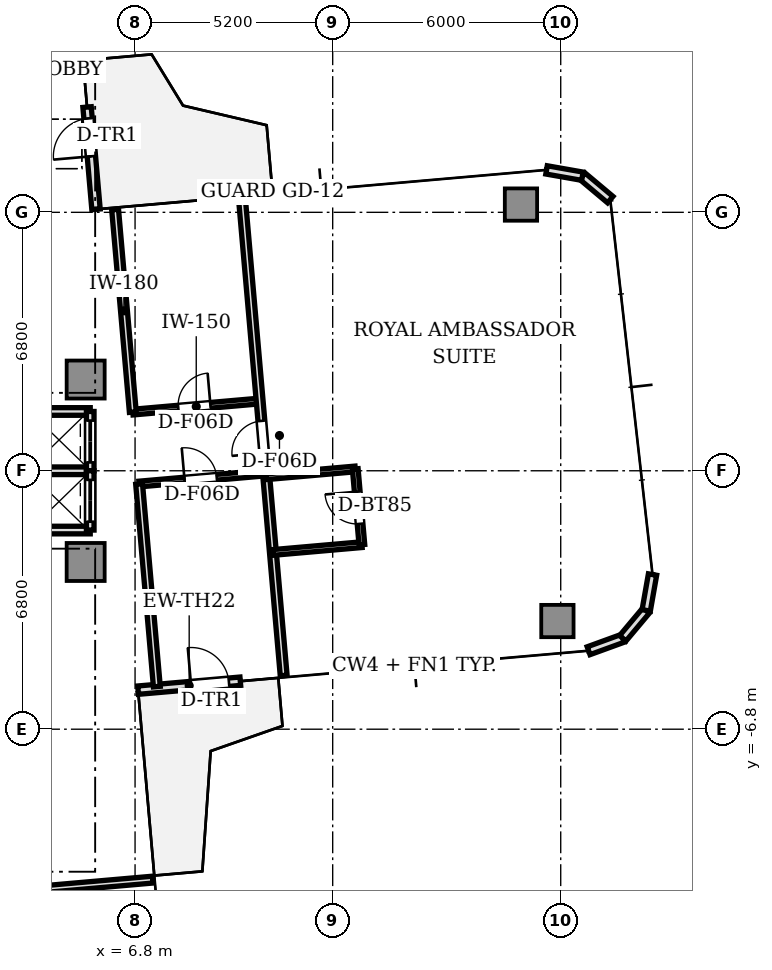
"""IFC4 building model, lengths in metres.
Left out: names, types, materials, properties, quantities, classifications, styles, units other than length and angle.
Written with IfcOpenShell. Run it as: python <this file> out.ifc"""

import sys

from ifc_helpers import new_model, si_unit, direction, frame, frame_2d, origin, origin_2d, place, context, subcontext, project, spatial, rectangle, extrude, source, transform, mapped, element, fill, save


model = new_model("IFC4")
c1 = context("Model", 3, precision=1e-05, world=origin(), true_north=direction((0.0, 1.0)))
c2 = subcontext(c1, "Body", "Model", "MODEL_VIEW")
j1 = project(units=[si_unit("LENGTHUNIT", "METRE"), si_unit("PLANEANGLEUNIT", "RADIAN")], contexts=[c1])
p1 = place(None, origin())
s1 = spatial("IfcSite", under=j1, at=p1, CompositionType="ELEMENT")
p2 = place(p1, origin())
s2 = spatial("IfcBuilding", under=s1, at=p2, CompositionType="ELEMENT")
p3 = place(p2, frame((0.0, 0.0, 147.25)))
s3 = spatial("IfcBuildingStorey", under=s2, at=p3, CompositionType="ELEMENT", Elevation=147.25)
m1 = source(origin(), c2, "Body", "SweptSolid", [
    extrude(rectangle(XDim=1.0, YDim=1.0, at=origin_2d()), origin(), (0.0, 0.0, 1.0), 3.11),
])
for number, where, z_axis, x_axis in (
    (1, (5.5, 2.4, 0.0), (0.0, 0.0, 1.0), (1.0, 0.0, 0.0)),
    (2, (5.5, -2.4, 0.0), (0.0, 0.0, 1.0), (1.0, 0.0, 0.0)),
):
    element("IfcColumn", number, at=place(p3, frame(where, z_axis=z_axis, x_axis=x_axis)), inside=s3, PredefinedType="COLUMN", context=c2, shape_type="MappedRepresentation", body=[
        mapped(m1, transform((0.0, 0.0, 0.0), scale=1.0)),
    ])
m2 = source(origin(), c2, "Body", "SweptSolid", [
    extrude(rectangle(XDim=0.85, YDim=0.85, at=origin_2d()), origin(), (0.0, 0.0, 1.0), 3.11),
])
for number, where, z_axis, x_axis in (
    (3, (17.913, -3.954, 0.0), (0.0, 0.0, 1.0), (1.0, 0.0, 0.0)),
    (4, (16.954, 7.004, 0.0), (0.0, 0.0, 1.0), (1.0, 0.0, 0.0)),
):
    element("IfcColumn", number, at=place(p3, frame(where, z_axis=z_axis, x_axis=x_axis)), inside=s3, PredefinedType="COLUMN", context=c2, shape_type="MappedRepresentation", body=[
        mapped(m2, transform((0.0, 0.0, 0.0), scale=1.0)),
    ])
p4 = place(p3, frame((6.879, -5.772, 0.0), z_axis=(0.0, 0.0, 1.0), x_axis=(0.996193619346, 0.087168071984, 0.0)))
e5 = element("IfcWall", 5, at=p4, inside=s3, PredefinedType="STANDARD", context=c2, shape_type="SweptSolid", body=[
    extrude(rectangle(XDim=2.7, YDim=0.22, at=frame_2d((1.35, 0.0))), origin(), (0.0, 0.0, 1.0), 3.11),
])
p5 = place(p4, frame((1.4, 0.0, 0.0)))
e6 = element("IfcOpeningElement", 6, at=p5, cuts=e5, PredefinedType="OPENING", context=c2, shape_type="SweptSolid", body=[
    extrude(rectangle(XDim=1.0, YDim=2.2, at=frame_2d((0.5, 1.1))), frame((0.0, 0.12, 0.0), z_axis=(0.0, -1.0, 0.0), x_axis=(1.0, 0.0, 0.0)), (0.0, 0.0, 1.0), 0.24),
])
p6 = place(p3, frame((18.734, -4.735, 0.0), z_axis=(0.0, 0.0, 1.0), x_axis=(0.939741306239, 0.34188635151, 0.0)))
e7 = element("IfcWall", 7, at=p6, inside=s3, PredefinedType="STANDARD", context=c2, shape_type="SweptSolid", body=[
    extrude(rectangle(XDim=0.958, YDim=0.22, at=frame_2d((0.479, 0.0))), origin(), (0.0, 0.0, 1.0), 3.11),
])
for number, where, z_axis, x_axis in (
    (8, (19.634, -4.408, 0.0), (0.0, 0.0, 1.0), (0.643, 0.766, 0.0)),
    (9, (20.25, -3.674, 0.0), (0.0, 0.0, 1.0), (0.174, 0.985, 0.0)),
):
    element("IfcWall", number, at=place(p3, frame(where, z_axis=z_axis, x_axis=x_axis)), inside=s3, PredefinedType="STANDARD", context=c2, shape_type="SweptSolid", body=[
        extrude(rectangle(XDim=0.958, YDim=0.22, at=frame_2d((0.479, 0.0))), origin(), (0.0, 0.0, 1.0), 3.11),
    ])
p7 = place(p3, frame((19.304, 7.135, 0.0), z_axis=(0.0, 0.0, 1.0), x_axis=(-0.766001159887, 0.642839189107, 0.0)))
e10 = element("IfcWall", 10, at=p7, inside=s3, PredefinedType="STANDARD", context=c2, shape_type="SweptSolid", body=[
    extrude(rectangle(XDim=0.958, YDim=0.22, at=frame_2d((0.479, 0.0))), origin(), (0.0, 0.0, 1.0), 3.11),
])
p8 = place(p3, frame((18.57, 7.75, 0.0), z_axis=(0.0, 0.0, 1.0), x_axis=(-0.984770724397, 0.173858046606, 0.0)))
e11 = element("IfcWall", 11, at=p8, inside=s3, PredefinedType="STANDARD", context=c2, shape_type="SweptSolid", body=[
    extrude(rectangle(XDim=0.958, YDim=0.22, at=frame_2d((0.479, 0.0))), origin(), (0.0, 0.0, 1.0), 3.11),
])
p9 = place(p3, frame((5.772, 6.879, 0.0), z_axis=(0.0, 0.0, 1.0), x_axis=(-0.087168071984, 0.996193619346, 0.0)))
e12 = element("IfcWall", 12, at=p9, inside=s3, PredefinedType="STANDARD", context=c2, shape_type="SweptSolid", body=[
    extrude(rectangle(XDim=2.7, YDim=0.22, at=frame_2d((1.35, 0.0))), origin(), (0.0, 0.0, 1.0), 3.11),
])
p10 = place(p9, frame((1.4, 0.0, 0.0)))
e13 = element("IfcOpeningElement", 13, at=p10, cuts=e12, PredefinedType="OPENING", context=c2, shape_type="SweptSolid", body=[
    extrude(rectangle(XDim=1.0, YDim=2.2, at=frame_2d((0.5, 1.1))), frame((0.0, 0.12, 0.0), z_axis=(0.0, -1.0, 0.0), x_axis=(1.0, 0.0, 0.0)), (0.0, 0.0, 1.0), 0.24),
])
for number, where, z_axis, x_axis in (
    (14, (3.98, 1.56, 0.0), (0.0, 0.0, 1.0), (1.0, 0.0, 0.0)),
    (15, (3.98, -1.56, 0.0), (0.0, 0.0, 1.0), (1.0, 0.0, 0.0)),
    (16, (3.98, 0.0, 0.0), (0.0, 0.0, 1.0), (1.0, 0.0, 0.0)),
):
    element("IfcWall", number, at=place(p3, frame(where, z_axis=z_axis, x_axis=x_axis)), inside=s3, PredefinedType="SOLIDWALL", context=c2, shape_type="SweptSolid", body=[
        extrude(rectangle(XDim=1.64, YDim=0.2, at=frame_2d((0.82, 0.0))), origin(), (0.0, 0.0, 1.0), 2.66),
    ])
p11 = place(p3, frame((5.62, 0.0, 0.0), z_axis=(0.0, 0.0, 1.0), x_axis=(0.0, 1.0, 0.0)))
e17 = element("IfcWall", 17, at=p11, inside=s3, PredefinedType="SOLIDWALL", context=c2, shape_type="SweptSolid", body=[
    extrude(rectangle(XDim=1.56, YDim=0.2, at=frame_2d((0.78, 0.0))), origin(), (0.0, 0.0, 1.0), 2.66),
])
p12 = place(p11, frame((0.22, 0.0, 0.0)))
e18 = element("IfcOpeningElement", 18, at=p12, cuts=e17, PredefinedType="OPENING", context=c2, shape_type="SweptSolid", body=[
    extrude(rectangle(XDim=1.1, YDim=2.2, at=frame_2d((0.55, 1.1))), frame((0.0, 0.11, 0.0), z_axis=(0.0, -1.0, 0.0), x_axis=(1.0, 0.0, 0.0)), (0.0, 0.0, 1.0), 0.22),
])
p13 = place(p3, frame((5.62, -1.56, 0.0), z_axis=(0.0, 0.0, 1.0), x_axis=(0.0, 1.0, 0.0)))
e19 = element("IfcWall", 19, at=p13, inside=s3, PredefinedType="SOLIDWALL", context=c2, shape_type="SweptSolid", body=[
    extrude(rectangle(XDim=1.56, YDim=0.2, at=frame_2d((0.78, 0.0))), origin(), (0.0, 0.0, 1.0), 2.66),
])
p14 = place(p13, frame((0.22, 0.0, 0.0)))
e20 = element("IfcOpeningElement", 20, at=p14, cuts=e19, PredefinedType="OPENING", context=c2, shape_type="SweptSolid", body=[
    extrude(rectangle(XDim=1.1, YDim=2.2, at=frame_2d((0.55, 1.1))), frame((0.0, 0.11, 0.0), z_axis=(0.0, -1.0, 0.0), x_axis=(1.0, 0.0, 0.0)), (0.0, 0.0, 1.0), 0.22),
])
p15 = place(p3, frame((6.741, 1.543, 0.0), z_axis=(0.0, 0.0, 1.0), x_axis=(0.996193954812, 0.087164238054, 0.0)))
e21 = element("IfcWall", 21, at=p15, inside=s3, PredefinedType="PARTITIONING", context=c2, shape_type="SweptSolid", body=[
    extrude(rectangle(XDim=3.35, YDim=0.15, at=frame_2d((1.675, 0.0))), origin(), (0.0, 0.0, 1.0), 2.66),
])
p16 = place(p15, frame((1.2, 0.0, 0.0)))
e22 = element("IfcOpeningElement", 22, at=p16, cuts=e21, PredefinedType="OPENING", context=c2, shape_type="SweptSolid", body=[
    extrude(rectangle(XDim=0.85, YDim=2.1, at=frame_2d((0.425, 1.05))), frame((0.0, 0.085, 0.0), z_axis=(0.0, -1.0, 0.0), x_axis=(1.0, 0.0, 0.0)), (0.0, 0.0, 1.0), 0.17),
])
p17 = place(p3, frame((6.907, -0.349, 0.0), z_axis=(0.0, 0.0, 1.0), x_axis=(0.996193954812, 0.087164238054, 0.0)))
e23 = element("IfcWall", 23, at=p17, inside=s3, PredefinedType="PARTITIONING", context=c2, shape_type="SweptSolid", body=[
    extrude(rectangle(XDim=3.35, YDim=0.15, at=frame_2d((1.675, 0.0))), origin(), (0.0, 0.0, 1.0), 2.66),
])
p18 = place(p17, frame((1.2, 0.0, 0.0)))
e24 = element("IfcOpeningElement", 24, at=p18, cuts=e23, PredefinedType="OPENING", context=c2, shape_type="SweptSolid", body=[
    extrude(rectangle(XDim=0.85, YDim=2.1, at=frame_2d((0.425, 1.05))), frame((0.0, 0.085, 0.0), z_axis=(0.0, -1.0, 0.0), x_axis=(1.0, 0.0, 0.0)), (0.0, 0.0, 1.0), 0.17),
])
for number, where, z_axis, x_axis in (
    (25, (6.741, 1.543, 0.0), (0.0, 0.0, 1.0), (-0.087, 0.996, 0.0)),
    (26, (7.373, -5.679, 0.0), (0.0, 0.0, 1.0), (-0.087, 0.996, 0.0)),
):
    element("IfcWall", number, at=place(p3, frame(where, z_axis=z_axis, x_axis=x_axis)), inside=s3, PredefinedType="PARTITIONING", context=c2, shape_type="SweptSolid", body=[
        extrude(rectangle(XDim=5.35, YDim=0.18, at=frame_2d((2.675, 0.0))), origin(), (0.0, 0.0, 1.0), 2.66),
    ])
p19 = place(p3, frame((10.71, -5.387, 0.0), z_axis=(0.0, 0.0, 1.0), x_axis=(-0.087154691724, 0.996194790044, 0.0)))
e27 = element("IfcWall", 27, at=p19, inside=s3, PredefinedType="PARTITIONING", context=c2, shape_type="SweptSolid", body=[
    extrude(rectangle(XDim=12.6, YDim=0.18, at=frame_2d((6.3, 0.0))), origin(), (0.0, 0.0, 1.0), 2.66),
])
p20 = place(p19, frame((5.875, 0.0, 0.0)))
e28 = element("IfcOpeningElement", 28, at=p20, cuts=e27, PredefinedType="OPENING", context=c2, shape_type="SweptSolid", body=[
    extrude(rectangle(XDim=0.85, YDim=2.1, at=frame_2d((0.425, 1.05))), frame((0.0, 0.1, 0.0), z_axis=(0.0, -1.0, 0.0), x_axis=(1.0, 0.0, 0.0)), (0.0, 0.0, 1.0), 0.2),
])
for number, where, z_axis, x_axis in (
    (29, (10.253, -0.157, 0.0), (0.0, 0.0, 1.0), (0.996, 0.087, 0.0)),
    (30, (10.427, -2.149, 0.0), (0.0, 0.0, 1.0), (0.996, 0.087, 0.0)),
):
    element("IfcWall", number, at=place(p3, frame(where, z_axis=z_axis, x_axis=x_axis)), inside=s3, PredefinedType="PARTITIONING", context=c2, shape_type="SweptSolid", body=[
        extrude(rectangle(XDim=2.35, YDim=0.15, at=frame_2d((1.175, 0.0))), origin(), (0.0, 0.0, 1.0), 2.66),
    ])
p21 = place(p3, frame((12.768, -1.945, 0.0), z_axis=(0.0, 0.0, 1.0), x_axis=(-0.087156350505, 0.99619464492, 0.0)))
e31 = element("IfcWall", 31, at=p21, inside=s3, PredefinedType="PARTITIONING", context=c2, shape_type="SweptSolid", body=[
    extrude(rectangle(XDim=2.0, YDim=0.15, at=frame_2d((1.0, 0.0))), origin(), (0.0, 0.0, 1.0), 2.66),
])
p22 = place(p21, frame((0.55, 0.0, 0.0)))
e32 = element("IfcOpeningElement", 32, at=p22, cuts=e31, PredefinedType="OPENING", context=c2, shape_type="SweptSolid", body=[
    extrude(rectangle(XDim=0.85, YDim=2.1, at=frame_2d((0.425, 1.05))), frame((0.0, 0.085, 0.0), z_axis=(0.0, -1.0, 0.0), x_axis=(1.0, 0.0, 0.0)), (0.0, 0.0, 1.0), 0.17),
])
p23 = place(p3, frame((5.287, 11.856, 0.0), z_axis=(0.0, 0.0, 1.0), x_axis=(-0.996194790044, -0.087154691724, 0.0)))
e33 = element("IfcWall", 33, at=p23, inside=s3, PredefinedType="PARTITIONING", context=c2, shape_type="SweptSolid", body=[
    extrude(rectangle(XDim=12.6, YDim=0.15, at=frame_2d((6.3, 0.0))), origin(), (0.0, 0.0, 1.0), 2.66),
])
p24 = place(p23, frame((5.5, 0.0, 0.0)))
e34 = element("IfcOpeningElement", 34, at=p24, cuts=e33, PredefinedType="OPENING", context=c2, shape_type="SweptSolid", body=[
    extrude(rectangle(XDim=1.6, YDim=2.25, at=frame_2d((0.8, 1.125))), frame((0.0, 0.085, 0.0), z_axis=(0.0, -1.0, 0.0), x_axis=(1.0, 0.0, 0.0)), (0.0, 0.0, 1.0), 0.17),
])
p25 = place(p3, frame((-3.095, -11.664, 0.0), z_axis=(0.0, 0.0, 1.0), x_axis=(0.996196061386, 0.087140158824, 0.0)))
e35 = element("IfcWall", 35, at=p25, inside=s3, PredefinedType="PARTITIONING", context=c2, shape_type="SweptSolid", body=[
    extrude(rectangle(XDim=10.4, YDim=0.18, at=frame_2d((5.2, 0.0))), origin(), (0.0, 0.0, 1.0), 2.66),
])
m3 = source(origin(), c2, "Body", "SweptSolid", [
    extrude(rectangle(XDim=1.0, YDim=0.05, at=origin_2d()), origin(), (0.0, 0.0, 1.0), 2.2),
])
p26 = place(p5, frame((0.5, 0.0, 0.0)))
e36 = element("IfcDoor", 36, at=p26, inside=s3, OperationType="SINGLE_SWING_LEFT", PredefinedType="DOOR", context=c2, shape_type="MappedRepresentation", body=[
    mapped(m3, transform((0.0, 0.0, 0.0), scale=1.0)),
])
fill(e6, e36)
p27 = place(p10, frame((0.5, 0.0, 0.0)))
e37 = element("IfcDoor", 37, at=p27, inside=s3, OperationType="SINGLE_SWING_LEFT", PredefinedType="DOOR", context=c2, shape_type="MappedRepresentation", body=[
    mapped(m3, transform((0.0, 0.0, 0.0), scale=1.0)),
])
fill(e13, e37)
m4 = source(origin(), c2, "Body", "SweptSolid", [
    extrude(rectangle(XDim=1.1, YDim=0.05, at=origin_2d()), origin(), (0.0, 0.0, 1.0), 2.2),
])
p28 = place(p12, frame((0.55, 0.0, 0.0)))
e38 = element("IfcDoor", 38, at=p28, inside=s3, OperationType="DOUBLE_DOOR_SLIDING", PredefinedType="DOOR", context=c2, shape_type="MappedRepresentation", body=[
    mapped(m4, transform((0.0, 0.0, 0.0), scale=1.0)),
])
fill(e18, e38)
p29 = place(p14, frame((0.55, 0.0, 0.0)))
e39 = element("IfcDoor", 39, at=p29, inside=s3, OperationType="DOUBLE_DOOR_SLIDING", PredefinedType="DOOR", context=c2, shape_type="MappedRepresentation", body=[
    mapped(m4, transform((0.0, 0.0, 0.0), scale=1.0)),
])
fill(e20, e39)
m5 = source(origin(), c2, "Body", "SweptSolid", [
    extrude(rectangle(XDim=0.85, YDim=0.05, at=origin_2d()), origin(), (0.0, 0.0, 1.0), 2.1),
])
p30 = place(p16, frame((0.425, 0.0, 0.0)))
e40 = element("IfcDoor", 40, at=p30, inside=s3, OperationType="SINGLE_SWING_RIGHT", PredefinedType="DOOR", context=c2, shape_type="MappedRepresentation", body=[
    mapped(m5, transform((0.0, 0.0, 0.0), scale=1.0)),
])
fill(e22, e40)
p31 = place(p18, frame((0.425, 0.0, 0.0)))
e41 = element("IfcDoor", 41, at=p31, inside=s3, OperationType="SINGLE_SWING_LEFT", PredefinedType="DOOR", context=c2, shape_type="MappedRepresentation", body=[
    mapped(m5, transform((0.0, 0.0, 0.0), scale=1.0)),
])
fill(e24, e41)
p32 = place(p22, frame((0.425, 0.0, 0.0)))
e42 = element("IfcDoor", 42, at=p32, inside=s3, OperationType="SINGLE_SWING_RIGHT", PredefinedType="DOOR", context=c2, shape_type="MappedRepresentation", body=[
    mapped(m5, transform((0.0, 0.0, 0.0), scale=1.0)),
])
fill(e32, e42)
p33 = place(p20, frame((0.425, 0.0, 0.0)))
e43 = element("IfcDoor", 43, at=p33, inside=s3, OperationType="SINGLE_SWING_LEFT", PredefinedType="DOOR", context=c2, shape_type="MappedRepresentation", body=[
    mapped(m5, transform((0.0, 0.0, 0.0), scale=1.0)),
])
fill(e28, e43)
save(model, sys.argv[1])
